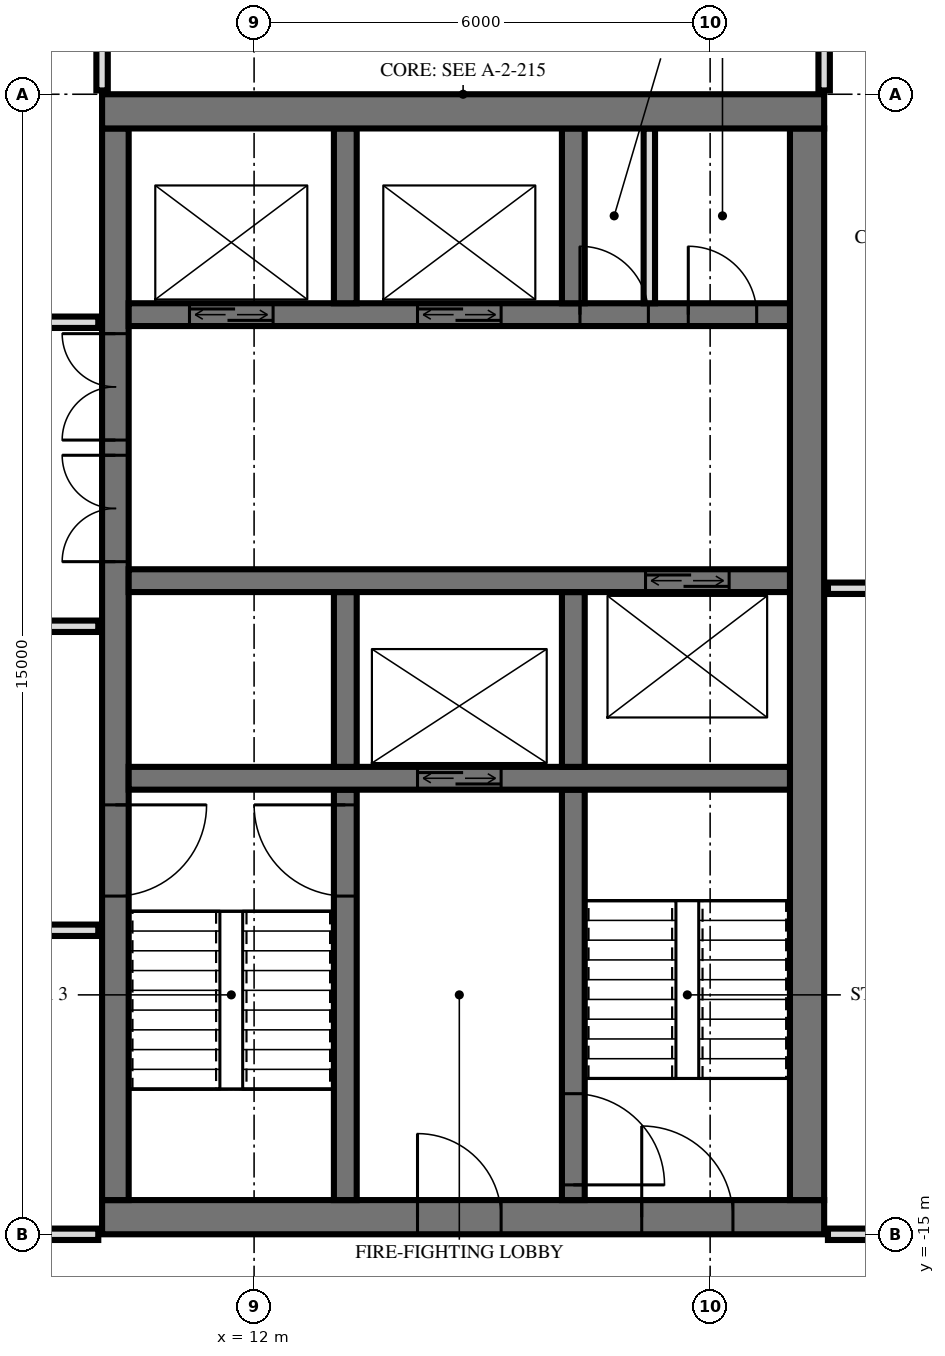
"""IFC4 building model, lengths in metres.
Left out: names, types, materials, properties, quantities, classifications, styles, units other than length and angle.
Written with IfcOpenShell. Run it as: python <this file> out.ifc"""

import sys

from ifc_helpers import new_model, si_unit, direction, frame, frame_2d, origin, place, context, subcontext, project, spatial, rectangle, extrude, element, fill, save


model = new_model("IFC4")
c1 = context("Model", 3, precision=1e-05, world=origin(), true_north=direction((0.0, 1.0)))
c2 = subcontext(c1, "Body", "Model", "MODEL_VIEW")
j1 = project(units=[si_unit("LENGTHUNIT", "METRE"), si_unit("PLANEANGLEUNIT", "RADIAN")], contexts=[c1])
p1 = place(None, origin())
s1 = spatial("IfcSite", under=j1, at=p1, CompositionType="ELEMENT")
p2 = place(p1, origin())
s2 = spatial("IfcBuilding", under=s1, at=p2, CompositionType="ELEMENT")
p3 = place(p2, frame((0.0, 0.0, 301.6)))
s3 = spatial("IfcBuildingStorey", under=s2, at=p3, CompositionType="ELEMENT", Elevation=301.6)
p4 = place(p3, frame((10.0, -0.225, 0.0), z_axis=(0.0, 0.0, 1.0), x_axis=(1.0, 0.0, 0.0)))
e1 = element("IfcWall", 1, at=p4, inside=s3, PredefinedType="SHEAR", context=c2, shape_type="SweptSolid", body=[
    extrude(rectangle(XDim=9.5, YDim=0.45, at=frame_2d((4.75, 0.0))), origin(), (0.0, 0.0, 1.0), 3.5),
])
p5 = place(p3, frame((10.0, -14.775, 0.0), z_axis=(0.0, 0.0, 1.0), x_axis=(1.0, 0.0, 0.0)))
e2 = element("IfcWall", 2, at=p5, inside=s3, PredefinedType="SHEAR", context=c2, shape_type="SweptSolid", body=[
    extrude(rectangle(XDim=9.5, YDim=0.45, at=frame_2d((4.75, 0.0))), origin(), (0.0, 0.0, 1.0), 3.5),
])
p6 = place(p5, frame((7.1, 0.0, 0.0)))
e3 = element("IfcOpeningElement", 3, at=p6, cuts=e2, PredefinedType="OPENING", context=c2, shape_type="SweptSolid", body=[
    extrude(rectangle(XDim=1.2, YDim=2.1, at=frame_2d((0.6, 1.05))), frame((0.0, 0.235, 0.0), z_axis=(0.0, -1.0, 0.0), x_axis=(1.0, 0.0, 0.0)), (0.0, 0.0, 1.0), 0.47),
])
p7 = place(p5, frame((4.15, 0.0, 0.0)))
e4 = element("IfcOpeningElement", 4, at=p7, cuts=e2, PredefinedType="OPENING", context=c2, shape_type="SweptSolid", body=[
    extrude(rectangle(XDim=1.1, YDim=2.1, at=frame_2d((0.55, 1.05))), frame((0.0, 0.235, 0.0), z_axis=(0.0, -1.0, 0.0), x_axis=(1.0, 0.0, 0.0)), (0.0, 0.0, 1.0), 0.47),
])
p8 = place(p3, frame((10.175, -14.55, 0.0), z_axis=(0.0, 0.0, 1.0), x_axis=(0.0, 1.0, 0.0)))
e5 = element("IfcWall", 5, at=p8, inside=s3, PredefinedType="SHEAR", context=c2, shape_type="SweptSolid", body=[
    extrude(rectangle(XDim=14.1, YDim=0.35, at=frame_2d((7.05, 0.0))), origin(), (0.0, 0.0, 1.0), 3.5),
])
p9 = place(p8, frame((8.4, 0.0, 0.0)))
e6 = element("IfcOpeningElement", 6, at=p9, cuts=e5, PredefinedType="OPENING", context=c2, shape_type="SweptSolid", body=[
    extrude(rectangle(XDim=1.4, YDim=2.4, at=frame_2d((0.7, 1.2))), frame((0.0, 0.185, 0.0), z_axis=(0.0, -1.0, 0.0), x_axis=(1.0, 0.0, 0.0)), (0.0, 0.0, 1.0), 0.37),
])
p10 = place(p8, frame((10.0, 0.0, 0.0)))
e7 = element("IfcOpeningElement", 7, at=p10, cuts=e5, PredefinedType="OPENING", context=c2, shape_type="SweptSolid", body=[
    extrude(rectangle(XDim=1.4, YDim=2.4, at=frame_2d((0.7, 1.2))), frame((0.0, 0.185, 0.0), z_axis=(0.0, -1.0, 0.0), x_axis=(1.0, 0.0, 0.0)), (0.0, 0.0, 1.0), 0.37),
])
p11 = place(p8, frame((4.0, 0.0, 0.0)))
e8 = element("IfcOpeningElement", 8, at=p11, cuts=e5, PredefinedType="OPENING", context=c2, shape_type="SweptSolid", body=[
    extrude(rectangle(XDim=1.2, YDim=2.1, at=frame_2d((0.6, 1.05))), frame((0.0, 0.185, 0.0), z_axis=(0.0, -1.0, 0.0), x_axis=(1.0, 0.0, 0.0)), (0.0, 0.0, 1.0), 0.37),
])
p12 = place(p3, frame((19.275, -14.55, 0.0), z_axis=(0.0, 0.0, 1.0), x_axis=(0.0, 1.0, 0.0)))
e9 = element("IfcWall", 9, at=p12, inside=s3, PredefinedType="SHEAR", context=c2, shape_type="SweptSolid", body=[
    extrude(rectangle(XDim=14.1, YDim=0.45, at=frame_2d((7.05, 0.0))), origin(), (0.0, 0.0, 1.0), 3.5),
])
p13 = place(p3, frame((10.35, -2.9, 0.0), z_axis=(0.0, 0.0, 1.0), x_axis=(1.0, 0.0, 0.0)))
e10 = element("IfcWall", 10, at=p13, inside=s3, PredefinedType="SHEAR", context=c2, shape_type="SweptSolid", body=[
    extrude(rectangle(XDim=8.7, YDim=0.3, at=frame_2d((4.35, 0.0))), origin(), (0.0, 0.0, 1.0), 3.5),
])
p14 = place(p13, frame((0.8, 0.0, 0.0)))
e11 = element("IfcOpeningElement", 11, at=p14, cuts=e10, PredefinedType="OPENING", context=c2, shape_type="SweptSolid", body=[
    extrude(rectangle(XDim=1.1, YDim=2.1, at=frame_2d((0.55, 1.05))), frame((0.0, 0.16, 0.0), z_axis=(0.0, -1.0, 0.0), x_axis=(1.0, 0.0, 0.0)), (0.0, 0.0, 1.0), 0.32),
])
p15 = place(p13, frame((3.8, 0.0, 0.0)))
e12 = element("IfcOpeningElement", 12, at=p15, cuts=e10, PredefinedType="OPENING", context=c2, shape_type="SweptSolid", body=[
    extrude(rectangle(XDim=1.1, YDim=2.1, at=frame_2d((0.55, 1.05))), frame((0.0, 0.16, 0.0), z_axis=(0.0, -1.0, 0.0), x_axis=(1.0, 0.0, 0.0)), (0.0, 0.0, 1.0), 0.32),
])
p16 = place(p13, frame((5.938, 0.0, 0.0)))
e13 = element("IfcOpeningElement", 13, at=p16, cuts=e10, PredefinedType="OPENING", context=c2, shape_type="SweptSolid", body=[
    extrude(rectangle(XDim=0.9, YDim=2.1, at=frame_2d((0.45, 1.05))), frame((0.0, 0.16, 0.0), z_axis=(0.0, -1.0, 0.0), x_axis=(1.0, 0.0, 0.0)), (0.0, 0.0, 1.0), 0.32),
])
p17 = place(p13, frame((7.363, 0.0, 0.0)))
e14 = element("IfcOpeningElement", 14, at=p17, cuts=e10, PredefinedType="OPENING", context=c2, shape_type="SweptSolid", body=[
    extrude(rectangle(XDim=0.9, YDim=2.1, at=frame_2d((0.45, 1.05))), frame((0.0, 0.16, 0.0), z_axis=(0.0, -1.0, 0.0), x_axis=(1.0, 0.0, 0.0)), (0.0, 0.0, 1.0), 0.32),
])
p18 = place(p3, frame((10.35, -6.4, 0.0), z_axis=(0.0, 0.0, 1.0), x_axis=(1.0, 0.0, 0.0)))
e15 = element("IfcWall", 15, at=p18, inside=s3, PredefinedType="SHEAR", context=c2, shape_type="SweptSolid", body=[
    extrude(rectangle(XDim=8.7, YDim=0.3, at=frame_2d((4.35, 0.0))), origin(), (0.0, 0.0, 1.0), 3.5),
])
p19 = place(p18, frame((6.8, 0.0, 0.0)))
e16 = element("IfcOpeningElement", 16, at=p19, cuts=e15, PredefinedType="OPENING", context=c2, shape_type="SweptSolid", body=[
    extrude(rectangle(XDim=1.1, YDim=2.1, at=frame_2d((0.55, 1.05))), frame((0.0, 0.16, 0.0), z_axis=(0.0, -1.0, 0.0), x_axis=(1.0, 0.0, 0.0)), (0.0, 0.0, 1.0), 0.32),
])
p20 = place(p3, frame((10.35, -9.0, 0.0), z_axis=(0.0, 0.0, 1.0), x_axis=(1.0, 0.0, 0.0)))
e17 = element("IfcWall", 17, at=p20, inside=s3, PredefinedType="SHEAR", context=c2, shape_type="SweptSolid", body=[
    extrude(rectangle(XDim=8.7, YDim=0.3, at=frame_2d((4.35, 0.0))), origin(), (0.0, 0.0, 1.0), 3.5),
])
p21 = place(p20, frame((3.8, 0.0, 0.0)))
e18 = element("IfcOpeningElement", 18, at=p21, cuts=e17, PredefinedType="OPENING", context=c2, shape_type="SweptSolid", body=[
    extrude(rectangle(XDim=1.1, YDim=2.1, at=frame_2d((0.55, 1.05))), frame((0.0, 0.16, 0.0), z_axis=(0.0, -1.0, 0.0), x_axis=(1.0, 0.0, 0.0)), (0.0, 0.0, 1.0), 0.32),
])
for number, where, z_axis, x_axis in (
    (19, (13.2, -2.75, 0.0), (0.0, 0.0, 1.0), (0.0, 1.0, 0.0)),
    (20, (13.2, -8.85, 0.0), (0.0, 0.0, 1.0), (0.0, 1.0, 0.0)),
):
    element("IfcWall", number, at=place(p3, frame(where, z_axis=z_axis, x_axis=x_axis)), inside=s3, PredefinedType="SHEAR", context=c2, shape_type="SweptSolid", body=[
        extrude(rectangle(XDim=2.3, YDim=0.3, at=frame_2d((1.15, 0.0))), origin(), (0.0, 0.0, 1.0), 3.5),
    ])
p22 = place(p3, frame((13.2, -14.55, 0.0), z_axis=(0.0, 0.0, 1.0), x_axis=(0.0, 1.0, 0.0)))
e21 = element("IfcWall", 21, at=p22, inside=s3, PredefinedType="SHEAR", context=c2, shape_type="SweptSolid", body=[
    extrude(rectangle(XDim=5.4, YDim=0.3, at=frame_2d((2.7, 0.0))), origin(), (0.0, 0.0, 1.0), 3.5),
])
p23 = place(p22, frame((4.0, 0.0, 0.0)))
e22 = element("IfcOpeningElement", 22, at=p23, cuts=e21, PredefinedType="OPENING", context=c2, shape_type="SweptSolid", body=[
    extrude(rectangle(XDim=1.2, YDim=2.1, at=frame_2d((0.6, 1.05))), frame((0.0, 0.16, 0.0), z_axis=(0.0, -1.0, 0.0), x_axis=(1.0, 0.0, 0.0)), (0.0, 0.0, 1.0), 0.32),
])
for number, where, z_axis, x_axis in (
    (23, (16.2, -2.75, 0.0), (0.0, 0.0, 1.0), (0.0, 1.0, 0.0)),
    (24, (16.2, -8.85, 0.0), (0.0, 0.0, 1.0), (0.0, 1.0, 0.0)),
):
    element("IfcWall", number, at=place(p3, frame(where, z_axis=z_axis, x_axis=x_axis)), inside=s3, PredefinedType="SHEAR", context=c2, shape_type="SweptSolid", body=[
        extrude(rectangle(XDim=2.3, YDim=0.3, at=frame_2d((1.15, 0.0))), origin(), (0.0, 0.0, 1.0), 3.5),
    ])
p24 = place(p3, frame((16.2, -14.55, 0.0), z_axis=(0.0, 0.0, 1.0), x_axis=(0.0, 1.0, 0.0)))
e25 = element("IfcWall", 25, at=p24, inside=s3, PredefinedType="SHEAR", context=c2, shape_type="SweptSolid", body=[
    extrude(rectangle(XDim=5.4, YDim=0.3, at=frame_2d((2.7, 0.0))), origin(), (0.0, 0.0, 1.0), 3.5),
])
p25 = place(p24, frame((0.2, 0.0, 0.0)))
e26 = element("IfcOpeningElement", 26, at=p25, cuts=e25, PredefinedType="OPENING", context=c2, shape_type="SweptSolid", body=[
    extrude(rectangle(XDim=1.2, YDim=2.1, at=frame_2d((0.6, 1.05))), frame((0.0, 0.16, 0.0), z_axis=(0.0, -1.0, 0.0), x_axis=(1.0, 0.0, 0.0)), (0.0, 0.0, 1.0), 0.32),
])
p26 = place(p3, frame((17.2, -2.75, 0.0), z_axis=(0.0, 0.0, 1.0), x_axis=(0.0, 1.0, 0.0)))
e27 = element("IfcWall", 27, at=p26, inside=s3, PredefinedType="PARTITIONING", context=c2, shape_type="SweptSolid", body=[
    extrude(rectangle(XDim=2.3, YDim=0.15, at=frame_2d((1.15, 0.0))), origin(), (0.0, 0.0, 1.0), 3.2),
])
p27 = place(p3, frame((19.5, 0.05, 0.0), z_axis=(0.0, 0.0, 1.0), x_axis=(0.0, 1.0, 0.0)))
e28 = element("IfcWall", 28, at=p27, inside=s3, PredefinedType="PARTITIONING", context=c2, shape_type="SweptSolid", body=[
    extrude(rectangle(XDim=0.787, YDim=0.15, at=frame_2d((0.394, 0.0))), origin(), (0.0, 0.0, 1.0), 3.22),
])
p28 = place(p3, frame((10.0, 0.05, 0.0), z_axis=(0.0, 0.0, 1.0), x_axis=(0.0, 1.0, 0.0)))
e29 = element("IfcWall", 29, at=p28, inside=s3, PredefinedType="PARTITIONING", context=c2, shape_type="SweptSolid", body=[
    extrude(rectangle(XDim=0.97, YDim=0.15, at=frame_2d((0.485, 0.0))), origin(), (0.0, 0.0, 1.0), 3.22),
])
p29 = place(p3, frame((-9.95, -15.0, 0.0), z_axis=(0.0, 0.0, 1.0), x_axis=(1.0, 0.0, 0.0)))
e30 = element("IfcWall", 30, at=p29, inside=s3, PredefinedType="PARTITIONING", context=c2, shape_type="SweptSolid", body=[
    extrude(rectangle(XDim=19.9, YDim=0.15, at=frame_2d((9.95, 0.0))), origin(), (0.0, 0.0, 1.0), 2.584),
])
p30 = place(p29, frame((9.45, 0.0, 0.0)))
e31 = element("IfcOpeningElement", 31, at=p30, cuts=e30, PredefinedType="OPENING", context=c2, shape_type="SweptSolid", body=[
    extrude(rectangle(XDim=1.0, YDim=2.1, at=frame_2d((0.5, 1.05))), frame((0.0, 0.085, 0.0), z_axis=(0.0, -1.0, 0.0), x_axis=(1.0, 0.0, 0.0)), (0.0, 0.0, 1.0), 0.17),
])
p31 = place(p3, frame((19.55, -15.0, 0.0), z_axis=(0.0, 0.0, 1.0), x_axis=(1.0, 0.0, 0.0)))
e32 = element("IfcWall", 32, at=p31, inside=s3, PredefinedType="PARTITIONING", context=c2, shape_type="SweptSolid", body=[
    extrude(rectangle(XDim=3.37, YDim=0.15, at=frame_2d((1.685, 0.0))), origin(), (0.0, 0.0, 1.0), 3.22),
])
p32 = place(p31, frame((0.9, 0.0, 0.0)))
e33 = element("IfcOpeningElement", 33, at=p32, cuts=e32, PredefinedType="OPENING", context=c2, shape_type="SweptSolid", body=[
    extrude(rectangle(XDim=1.0, YDim=2.1, at=frame_2d((0.5, 1.05))), frame((0.0, 0.085, 0.0), z_axis=(0.0, -1.0, 0.0), x_axis=(1.0, 0.0, 0.0)), (0.0, 0.0, 1.0), 0.17),
])
p33 = place(p3, frame((-9.95, -11.0, 0.0), z_axis=(0.0, 0.0, 1.0), x_axis=(1.0, 0.0, 0.0)))
e34 = element("IfcWall", 34, at=p33, inside=s3, PredefinedType="PARTITIONING", context=c2, shape_type="SweptSolid", body=[
    extrude(rectangle(XDim=19.9, YDim=0.15, at=frame_2d((9.95, 0.0))), origin(), (0.0, 0.0, 1.0), 3.22),
])
p34 = place(p33, frame((9.45, 0.0, 0.0)))
e35 = element("IfcOpeningElement", 35, at=p34, cuts=e34, PredefinedType="OPENING", context=c2, shape_type="SweptSolid", body=[
    extrude(rectangle(XDim=1.0, YDim=2.1, at=frame_2d((0.5, 1.05))), frame((0.0, 0.085, 0.0), z_axis=(0.0, -1.0, 0.0), x_axis=(1.0, 0.0, 0.0)), (0.0, 0.0, 1.0), 0.17),
])
p35 = place(p33, frame((15.45, 0.0, 0.0)))
e36 = element("IfcOpeningElement", 36, at=p35, cuts=e34, PredefinedType="OPENING", context=c2, shape_type="SweptSolid", body=[
    extrude(rectangle(XDim=1.0, YDim=2.1, at=frame_2d((0.5, 1.05))), frame((0.0, 0.085, 0.0), z_axis=(0.0, -1.0, 0.0), x_axis=(1.0, 0.0, 0.0)), (0.0, 0.0, 1.0), 0.17),
])
p36 = place(p3, frame((-9.95, -7.0, 0.0), z_axis=(0.0, 0.0, 1.0), x_axis=(1.0, 0.0, 0.0)))
e37 = element("IfcWall", 37, at=p36, inside=s3, PredefinedType="PARTITIONING", context=c2, shape_type="SweptSolid", body=[
    extrude(rectangle(XDim=19.9, YDim=0.15, at=frame_2d((9.95, 0.0))), origin(), (0.0, 0.0, 1.0), 3.22),
])
p37 = place(p36, frame((9.45, 0.0, 0.0)))
e38 = element("IfcOpeningElement", 38, at=p37, cuts=e37, PredefinedType="OPENING", context=c2, shape_type="SweptSolid", body=[
    extrude(rectangle(XDim=1.0, YDim=2.1, at=frame_2d((0.5, 1.05))), frame((0.0, 0.085, 0.0), z_axis=(0.0, -1.0, 0.0), x_axis=(1.0, 0.0, 0.0)), (0.0, 0.0, 1.0), 0.17),
])
p38 = place(p36, frame((3.45, 0.0, 0.0)))
e39 = element("IfcOpeningElement", 39, at=p38, cuts=e37, PredefinedType="OPENING", context=c2, shape_type="SweptSolid", body=[
    extrude(rectangle(XDim=1.0, YDim=2.1, at=frame_2d((0.5, 1.05))), frame((0.0, 0.085, 0.0), z_axis=(0.0, -1.0, 0.0), x_axis=(1.0, 0.0, 0.0)), (0.0, 0.0, 1.0), 0.17),
])
p39 = place(p3, frame((19.55, -6.5, 0.0), z_axis=(0.0, 0.0, 1.0), x_axis=(1.0, 0.0, 0.0)))
e40 = element("IfcWall", 40, at=p39, inside=s3, PredefinedType="PLUMBINGWALL", context=c2, shape_type="SweptSolid", body=[
    extrude(rectangle(XDim=3.37, YDim=0.15, at=frame_2d((1.685, 0.0))), origin(), (0.0, 0.0, 1.0), 3.22),
])
p40 = place(p39, frame((1.3, 0.0, 0.0)))
e41 = element("IfcOpeningElement", 41, at=p40, cuts=e40, PredefinedType="OPENING", context=c2, shape_type="SweptSolid", body=[
    extrude(rectangle(XDim=0.9, YDim=2.1, at=frame_2d((0.45, 1.05))), frame((0.0, 0.085, 0.0), z_axis=(0.0, -1.0, 0.0), x_axis=(1.0, 0.0, 0.0)), (0.0, 0.0, 1.0), 0.17),
])
p41 = place(p3, frame((-9.95, -3.0, 0.0), z_axis=(0.0, 0.0, 1.0), x_axis=(1.0, 0.0, 0.0)))
e42 = element("IfcWall", 42, at=p41, inside=s3, PredefinedType="PARTITIONING", context=c2, shape_type="SweptSolid", body=[
    extrude(rectangle(XDim=19.9, YDim=0.15, at=frame_2d((9.95, 0.0))), origin(), (0.0, 0.0, 1.0), 3.22),
])
p42 = place(p41, frame((1.45, 0.0, 0.0)))
e43 = element("IfcOpeningElement", 43, at=p42, cuts=e42, PredefinedType="OPENING", context=c2, shape_type="SweptSolid", body=[
    extrude(rectangle(XDim=1.0, YDim=2.1, at=frame_2d((0.5, 1.05))), frame((0.0, 0.085, 0.0), z_axis=(0.0, -1.0, 0.0), x_axis=(1.0, 0.0, 0.0)), (0.0, 0.0, 1.0), 0.17),
])
p43 = place(p41, frame((4.95, 0.0, 0.0)))
e44 = element("IfcOpeningElement", 44, at=p43, cuts=e42, PredefinedType="OPENING", context=c2, shape_type="SweptSolid", body=[
    extrude(rectangle(XDim=1.0, YDim=2.1, at=frame_2d((0.5, 1.05))), frame((0.0, 0.085, 0.0), z_axis=(0.0, -1.0, 0.0), x_axis=(1.0, 0.0, 0.0)), (0.0, 0.0, 1.0), 0.17),
])
p44 = place(p41, frame((7.7, 0.0, 0.0)))
e45 = element("IfcOpeningElement", 45, at=p44, cuts=e42, PredefinedType="OPENING", context=c2, shape_type="SweptSolid", body=[
    extrude(rectangle(XDim=1.0, YDim=2.1, at=frame_2d((0.5, 1.05))), frame((0.0, 0.085, 0.0), z_axis=(0.0, -1.0, 0.0), x_axis=(1.0, 0.0, 0.0)), (0.0, 0.0, 1.0), 0.17),
])
p45 = place(p41, frame((14.2, 0.0, 0.0)))
e46 = element("IfcOpeningElement", 46, at=p45, cuts=e42, PredefinedType="OPENING", context=c2, shape_type="SweptSolid", body=[
    extrude(rectangle(XDim=1.0, YDim=2.1, at=frame_2d((0.5, 1.05))), frame((0.0, 0.085, 0.0), z_axis=(0.0, -1.0, 0.0), x_axis=(1.0, 0.0, 0.0)), (0.0, 0.0, 1.0), 0.17),
])
p46 = place(p14, origin())
e47 = element("IfcDoor", 47, at=p46, inside=s3, OperationType="DOUBLE_DOOR_SLIDING", PredefinedType="USERDEFINED", context=c2, shape_type="SweptSolid", body=[
    extrude(rectangle(XDim=1.1, YDim=2.1, at=frame_2d((0.55, 1.05))), frame((0.0, 0.025, 0.0), z_axis=(0.0, -1.0, 0.0), x_axis=(1.0, 0.0, 0.0)), (0.0, 0.0, 1.0), 0.05),
])
fill(e11, e47)
p47 = place(p15, origin())
e48 = element("IfcDoor", 48, at=p47, inside=s3, OperationType="DOUBLE_DOOR_SLIDING", PredefinedType="USERDEFINED", context=c2, shape_type="SweptSolid", body=[
    extrude(rectangle(XDim=1.1, YDim=2.1, at=frame_2d((0.55, 1.05))), frame((0.0, 0.025, 0.0), z_axis=(0.0, -1.0, 0.0), x_axis=(1.0, 0.0, 0.0)), (0.0, 0.0, 1.0), 0.05),
])
fill(e12, e48)
p48 = place(p21, origin())
e49 = element("IfcDoor", 49, at=p48, inside=s3, OperationType="DOUBLE_DOOR_SLIDING", PredefinedType="USERDEFINED", context=c2, shape_type="SweptSolid", body=[
    extrude(rectangle(XDim=1.1, YDim=2.1, at=frame_2d((0.55, 1.05))), frame((0.0, 0.025, 0.0), z_axis=(0.0, -1.0, 0.0), x_axis=(1.0, 0.0, 0.0)), (0.0, 0.0, 1.0), 0.05),
])
fill(e18, e49)
p49 = place(p19, origin())
e50 = element("IfcDoor", 50, at=p49, inside=s3, OperationType="DOUBLE_DOOR_SLIDING", PredefinedType="USERDEFINED", context=c2, shape_type="SweptSolid", body=[
    extrude(rectangle(XDim=1.1, YDim=2.1, at=frame_2d((0.55, 1.05))), frame((0.0, 0.025, 0.0), z_axis=(0.0, -1.0, 0.0), x_axis=(1.0, 0.0, 0.0)), (0.0, 0.0, 1.0), 0.05),
])
fill(e16, e50)
p50 = place(p9, origin())
e51 = element("IfcDoor", 51, at=p50, inside=s3, OperationType="DOUBLE_DOOR_SINGLE_SWING", PredefinedType="DOOR", context=c2, shape_type="SweptSolid", body=[
    extrude(rectangle(XDim=1.4, YDim=2.4, at=frame_2d((0.7, 1.2))), frame((0.0, 0.025, 0.0), z_axis=(0.0, -1.0, 0.0), x_axis=(1.0, 0.0, 0.0)), (0.0, 0.0, 1.0), 0.05),
])
fill(e6, e51)
p51 = place(p10, origin())
e52 = element("IfcDoor", 52, at=p51, inside=s3, OperationType="DOUBLE_DOOR_SINGLE_SWING", PredefinedType="DOOR", context=c2, shape_type="SweptSolid", body=[
    extrude(rectangle(XDim=1.4, YDim=2.4, at=frame_2d((0.7, 1.2))), frame((0.0, 0.025, 0.0), z_axis=(0.0, -1.0, 0.0), x_axis=(1.0, 0.0, 0.0)), (0.0, 0.0, 1.0), 0.05),
])
fill(e7, e52)
p52 = place(p11, frame((0.6, 0.0, 0.0), z_axis=(0.0, 0.0, 1.0), x_axis=(-1.0, 0.0, 0.0)))
e53 = element("IfcDoor", 53, at=p52, inside=s3, OperationType="SINGLE_SWING_RIGHT", PredefinedType="DOOR", context=c2, shape_type="SweptSolid", body=[
    extrude(rectangle(XDim=1.2, YDim=2.1, at=frame_2d((0.0, 1.05))), frame((0.0, -0.025, 0.0), z_axis=(0.0, 1.0, 0.0), x_axis=(-1.0, 0.0, 0.0)), (0.0, 0.0, 1.0), 0.05),
])
fill(e8, e53)
p53 = place(p6, origin())
e54 = element("IfcDoor", 54, at=p53, inside=s3, OperationType="SINGLE_SWING_RIGHT", PredefinedType="DOOR", context=c2, shape_type="SweptSolid", body=[
    extrude(rectangle(XDim=1.2, YDim=2.1, at=frame_2d((0.6, 1.05))), frame((0.0, 0.025, 0.0), z_axis=(0.0, -1.0, 0.0), x_axis=(1.0, 0.0, 0.0)), (0.0, 0.0, 1.0), 0.05),
])
fill(e3, e54)
p54 = place(p7, origin())
e55 = element("IfcDoor", 55, at=p54, inside=s3, OperationType="SINGLE_SWING_RIGHT", PredefinedType="DOOR", context=c2, shape_type="SweptSolid", body=[
    extrude(rectangle(XDim=1.1, YDim=2.1, at=frame_2d((0.55, 1.05))), frame((0.0, 0.025, 0.0), z_axis=(0.0, -1.0, 0.0), x_axis=(1.0, 0.0, 0.0)), (0.0, 0.0, 1.0), 0.05),
])
fill(e4, e55)
p55 = place(p16, origin())
e56 = element("IfcDoor", 56, at=p55, inside=s3, OperationType="SINGLE_SWING_RIGHT", PredefinedType="DOOR", context=c2, shape_type="SweptSolid", body=[
    extrude(rectangle(XDim=0.9, YDim=2.1, at=frame_2d((0.45, 1.05))), frame((0.0, 0.025, 0.0), z_axis=(0.0, -1.0, 0.0), x_axis=(1.0, 0.0, 0.0)), (0.0, 0.0, 1.0), 0.05),
])
fill(e13, e56)
p56 = place(p17, origin())
e57 = element("IfcDoor", 57, at=p56, inside=s3, OperationType="SINGLE_SWING_RIGHT", PredefinedType="DOOR", context=c2, shape_type="SweptSolid", body=[
    extrude(rectangle(XDim=0.9, YDim=2.1, at=frame_2d((0.45, 1.05))), frame((0.0, 0.025, 0.0), z_axis=(0.0, -1.0, 0.0), x_axis=(1.0, 0.0, 0.0)), (0.0, 0.0, 1.0), 0.05),
])
fill(e14, e57)
p57 = place(p23, origin())
e58 = element("IfcDoor", 58, at=p57, inside=s3, OperationType="SINGLE_SWING_LEFT", PredefinedType="DOOR", context=c2, shape_type="SweptSolid", body=[
    extrude(rectangle(XDim=1.2, YDim=2.1, at=frame_2d((0.6, 1.05))), frame((0.0, 0.025, 0.0), z_axis=(0.0, -1.0, 0.0), x_axis=(1.0, 0.0, 0.0)), (0.0, 0.0, 1.0), 0.05),
])
fill(e22, e58)
p58 = place(p25, frame((0.6, 0.0, 0.0), z_axis=(0.0, 0.0, 1.0), x_axis=(-1.0, 0.0, 0.0)))
e59 = element("IfcDoor", 59, at=p58, inside=s3, OperationType="SINGLE_SWING_LEFT", PredefinedType="DOOR", context=c2, shape_type="SweptSolid", body=[
    extrude(rectangle(XDim=1.2, YDim=2.1, at=frame_2d((0.0, 1.05))), frame((0.0, -0.025, 0.0), z_axis=(0.0, 1.0, 0.0), x_axis=(-1.0, 0.0, 0.0)), (0.0, 0.0, 1.0), 0.05),
])
fill(e26, e59)
save(model, sys.argv[1])
